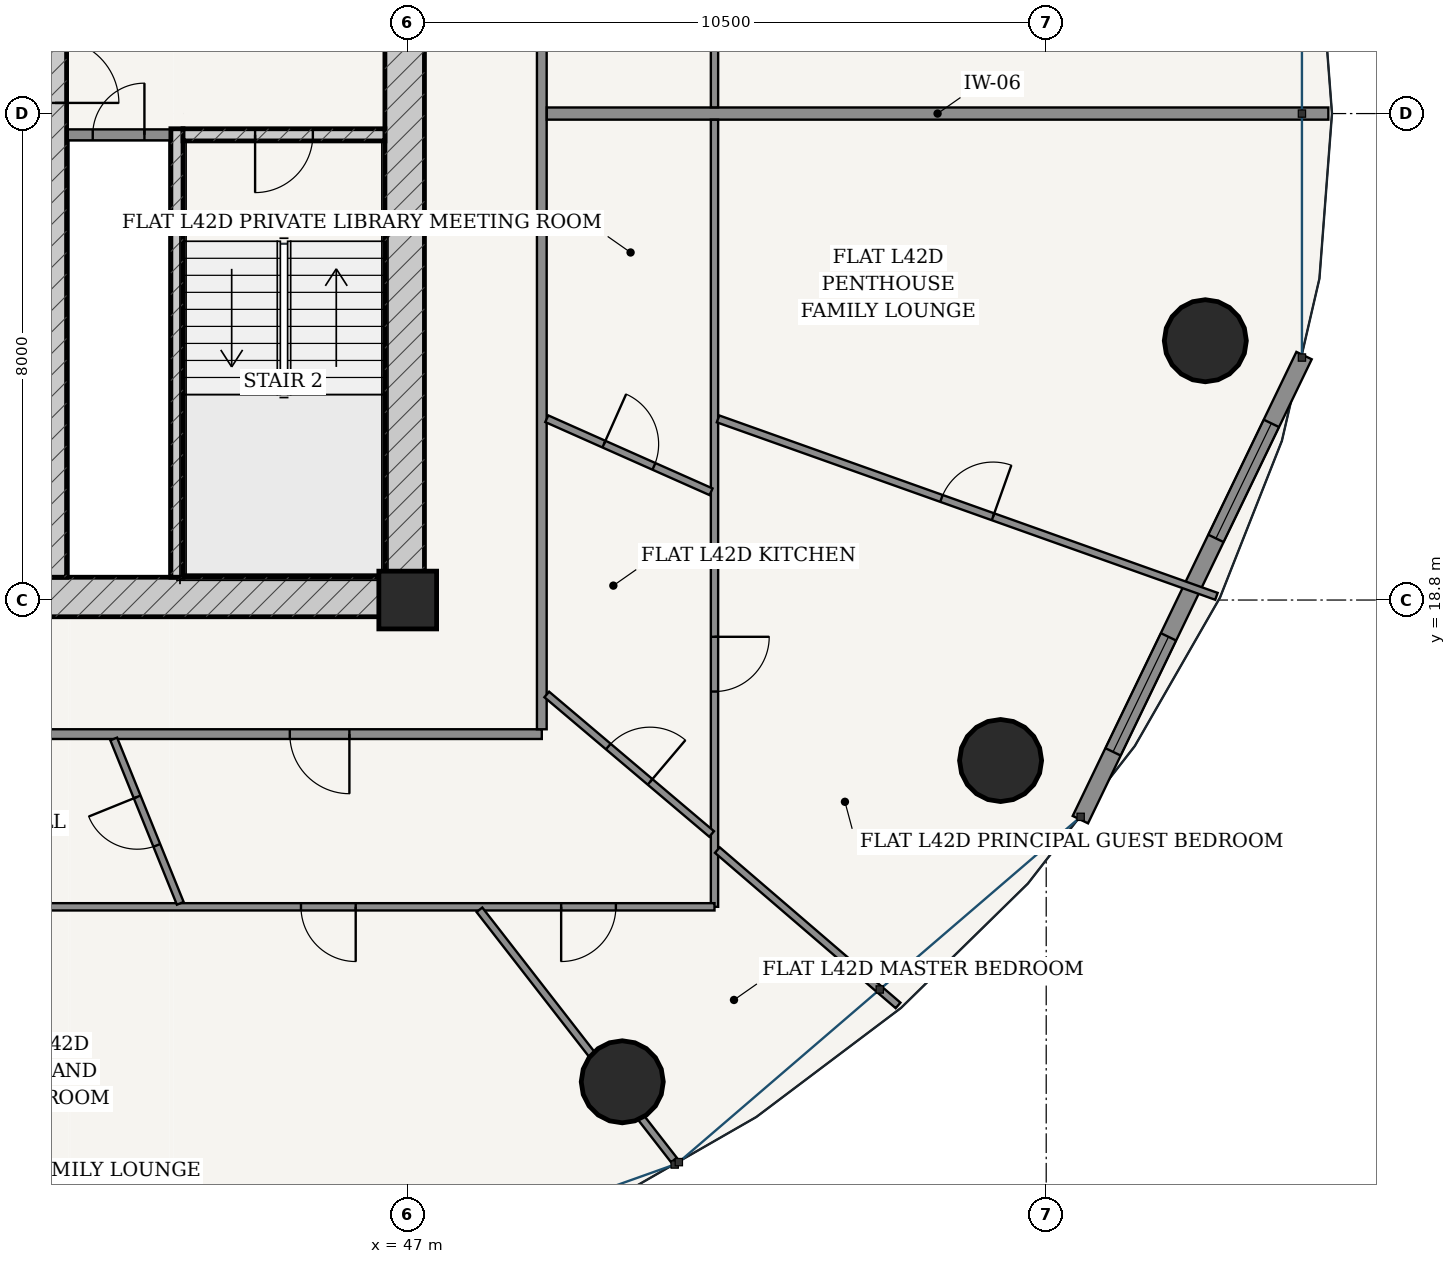
"""IFC4 building model, lengths in metres.
Left out: names, types, materials, properties, quantities, classifications, styles, units other than length and angle.
Written with IfcOpenShell. Run it as: python <this file> out.ifc"""

import sys

from ifc_helpers import new_model, si_unit, direction, frame, frame_2d, origin, origin_2d, place, context, subcontext, project, spatial, rectangle, hollow_circle, extrude, source, transform, mapped, element, fill, save


model = new_model("IFC4")
c1 = context("Model", 3, precision=1e-05, world=origin(), true_north=direction((-0.2419218956, 0.970295726276)))
c2 = subcontext(c1, "Body", "Model", "MODEL_VIEW")
j1 = project(units=[si_unit("LENGTHUNIT", "METRE"), si_unit("PLANEANGLEUNIT", "RADIAN")], contexts=[c1])
p1 = place(None, origin())
s1 = spatial("IfcSite", under=j1, at=p1, CompositionType="ELEMENT")
p2 = place(p1, origin())
s2 = spatial("IfcBuilding", under=s1, at=p2, CompositionType="ELEMENT")
p3 = place(p2, frame((0.0, 0.0, 160.6)))
s3 = spatial("IfcBuildingStorey", under=s2, at=p3, CompositionType="ELEMENT", Elevation=160.6)
p4 = place(p3, frame((47.0, 18.8, 0.0), z_axis=(0.0, 0.0, 1.0), x_axis=(1.0, 0.0, 0.0)))
e1 = element("IfcColumn", 1, at=p4, inside=s3, PredefinedType="COLUMN", context=c2, shape_type="SweptSolid", body=[
    extrude(rectangle(XDim=0.95, YDim=0.95, at=origin_2d()), origin(), (0.0, 0.0, 1.0), 3.6),
])
p5 = place(p3, frame((28.725, 18.85, 0.0), z_axis=(0.0, 0.0, 1.0), x_axis=(1.0, 0.0, 0.0)))
e2 = element("IfcWall", 2, at=p5, inside=s3, PredefinedType="SHEAR", context=c2, shape_type="SweptSolid", body=[
    extrude(rectangle(XDim=18.55, YDim=0.65, at=frame_2d((9.275, 0.0))), origin(), (0.0, 0.0, 1.0), 3.33),
])
p6 = place(p5, frame((8.85, 0.0, 0.0)))
e3 = element("IfcOpeningElement", 3, at=p6, cuts=e2, PredefinedType="OPENING", context=c2, shape_type="SweptSolid", body=[
    extrude(rectangle(XDim=0.85, YDim=2.1, at=frame_2d((0.425, 1.05))), frame((0.0, 0.335, 0.0), z_axis=(0.0, -1.0, 0.0), x_axis=(1.0, 0.0, 0.0)), (0.0, 0.0, 1.0), 0.67),
])
p7 = place(p3, frame((46.95, 19.175, 0.0), z_axis=(0.0, 0.0, 1.0), x_axis=(0.0, 1.0, 0.0)))
e4 = element("IfcWall", 4, at=p7, inside=s3, PredefinedType="SHEAR", context=c2, shape_type="SweptSolid", body=[
    extrude(rectangle(XDim=15.25, YDim=0.65, at=frame_2d((7.625, 0.0))), origin(), (0.0, 0.0, 1.0), 3.33),
])
p8 = place(p7, frame((9.875, 0.0, 0.0)))
e5 = element("IfcOpeningElement", 5, at=p8, cuts=e4, PredefinedType="OPENING", context=c2, shape_type="SweptSolid", body=[
    extrude(rectangle(XDim=1.5, YDim=2.2, at=frame_2d((0.75, 1.1))), frame((0.0, 0.335, 0.0), z_axis=(0.0, -1.0, 0.0), x_axis=(1.0, 0.0, 0.0)), (0.0, 0.0, 1.0), 0.67),
])
p9 = place(p3, frame((43.205, 19.175, 0.0), z_axis=(0.0, 0.0, 1.0), x_axis=(0.0, 1.0, 0.0)))
e6 = element("IfcWall", 6, at=p9, inside=s3, PredefinedType="SOLIDWALL", context=c2, shape_type="SweptSolid", body=[
    extrude(rectangle(XDim=7.375, YDim=0.2, at=frame_2d((3.688, 0.0))), origin(), (0.0, 0.0, 1.0), 3.33),
])
p10 = place(p3, frame((43.305, 26.45, 0.0), z_axis=(0.0, 0.0, 1.0), x_axis=(1.0, 0.0, 0.0)))
e7 = element("IfcWall", 7, at=p10, inside=s3, PredefinedType="SOLIDWALL", context=c2, shape_type="SweptSolid", body=[
    extrude(rectangle(XDim=3.32, YDim=0.2, at=frame_2d((1.66, 0.0))), origin(), (0.0, 0.0, 1.0), 3.33),
])
p11 = place(p10, frame((1.185, 0.0, 0.0)))
e8 = element("IfcOpeningElement", 8, at=p11, cuts=e7, PredefinedType="OPENING", context=c2, shape_type="SweptSolid", body=[
    extrude(rectangle(XDim=0.95, YDim=2.15, at=frame_2d((0.475, 1.075))), frame((0.0, 0.11, 0.0), z_axis=(0.0, -1.0, 0.0), x_axis=(1.0, 0.0, 0.0)), (0.0, 0.0, 1.0), 0.22),
])
p12 = place(p3, frame((41.2, 19.175, 0.0), z_axis=(0.0, 0.0, 1.0), x_axis=(0.0, 1.0, 0.0)))
e9 = element("IfcWall", 9, at=p12, inside=s3, PredefinedType="SHEAR", context=c2, shape_type="SweptSolid", body=[
    extrude(rectangle(XDim=15.25, YDim=0.38, at=frame_2d((7.625, 0.0))), origin(), (0.0, 0.0, 1.0), 3.33),
])
p13 = place(p12, frame((7.8, 0.0, 0.0)))
e10 = element("IfcOpeningElement", 10, at=p13, cuts=e9, PredefinedType="OPENING", context=c2, shape_type="SweptSolid", body=[
    extrude(rectangle(XDim=1.05, YDim=2.15, at=frame_2d((0.525, 1.075))), frame((0.0, 0.2, 0.0), z_axis=(0.0, -1.0, 0.0), x_axis=(1.0, 0.0, 0.0)), (0.0, 0.0, 1.0), 0.4),
])
for number, where, z_axis, x_axis in (
    (11, (50.528, 10.877, 0.0), (0.0, 0.0, 1.0), (1.0, 0.0, 0.0)),
    (12, (56.75, 16.161, 0.0), (0.0, 0.0, 1.0), (1.0, 0.0, 0.0)),
    (13, (60.117, 23.064, 0.0), (0.0, 0.0, 1.0), (1.0, 0.0, 0.0)),
):
    element("IfcColumn", number, at=place(p3, frame(where, z_axis=z_axis, x_axis=x_axis)), inside=s3, PredefinedType="COLUMN", context=c2, shape_type="SweptSolid", body=[
        extrude(hollow_circle(Radius=0.675, WallThickness=0.042, at=origin_2d()), origin(), (0.0, 0.0, 1.0), 3.6),
    ])
p14 = place(p3, frame((58.062, 15.189, 0.0), z_axis=(0.0, 0.0, 1.0), x_axis=(0.434209827226, 0.900811759437, 0.0)))
e14 = element("IfcWall", 14, at=p14, inside=s3, PredefinedType="SOLIDWALL", context=c2, shape_type="SweptSolid", body=[
    extrude(rectangle(XDim=8.472, YDim=0.28, at=frame_2d((4.236, 0.0))), origin(), (0.0, 0.0, 1.0), 3.33),
])
p15 = place(p14, frame((1.237, 0.0, 0.85)))
e15 = element("IfcOpeningElement", 15, at=p15, cuts=e14, PredefinedType="OPENING", context=c2, shape_type="SweptSolid", body=[
    extrude(rectangle(XDim=2.1, YDim=1.95, at=frame_2d((1.05, 0.975))), frame((0.0, 0.15, 0.0), z_axis=(0.0, -1.0, 0.0), x_axis=(1.0, 0.0, 0.0)), (0.0, 0.0, 1.0), 0.3),
])
p16 = place(p14, frame((5.134, 0.0, 0.85)))
e16 = element("IfcOpeningElement", 16, at=p16, cuts=e14, PredefinedType="OPENING", context=c2, shape_type="SweptSolid", body=[
    extrude(rectangle(XDim=2.1, YDim=1.95, at=frame_2d((1.05, 0.975))), frame((0.0, 0.15, 0.0), z_axis=(0.0, -1.0, 0.0), x_axis=(1.0, 0.0, 0.0)), (0.0, 0.0, 1.0), 0.3),
])
p17 = place(p3, frame((41.39, 26.45, 0.0), z_axis=(0.0, 0.0, 1.0), x_axis=(1.0, 0.0, 0.0)))
e17 = element("IfcWall", 17, at=p17, inside=s3, PredefinedType="PARTITIONING", context=c2, shape_type="SweptSolid", body=[
    extrude(rectangle(XDim=1.71, YDim=0.18, at=frame_2d((0.855, 0.0))), origin(), (0.0, 0.0, 1.0), 3.33),
])
p18 = place(p17, frame((0.43, 0.0, 0.0)))
e18 = element("IfcOpeningElement", 18, at=p18, cuts=e17, PredefinedType="OPENING", context=c2, shape_type="SweptSolid", body=[
    extrude(rectangle(XDim=0.85, YDim=2.1, at=frame_2d((0.425, 1.05))), frame((0.0, 0.1, 0.0), z_axis=(0.0, -1.0, 0.0), x_axis=(1.0, 0.0, 0.0)), (0.0, 0.0, 1.0), 0.2),
])
p19 = place(p3, frame((34.32, 16.595, 0.0), z_axis=(0.0, 0.0, 1.0), x_axis=(1.0, 0.0, 0.0)))
e19 = element("IfcWall", 19, at=p19, inside=s3, PredefinedType="PARTITIONING", context=c2, shape_type="SweptSolid", body=[
    extrude(rectangle(XDim=14.885, YDim=0.16, at=frame_2d((7.442, 0.0))), origin(), (0.0, 0.0, 1.0), 2.776),
])
p20 = place(p19, frame((1.484, 0.0, 0.0)))
e20 = element("IfcOpeningElement", 20, at=p20, cuts=e19, PredefinedType="OPENING", context=c2, shape_type="SweptSolid", body=[
    extrude(rectangle(XDim=0.98, YDim=2.2, at=frame_2d((0.49, 1.1))), frame((0.0, 0.09, 0.0), z_axis=(0.0, -1.0, 0.0), x_axis=(1.0, 0.0, 0.0)), (0.0, 0.0, 1.0), 0.18),
])
p21 = place(p19, frame((10.741, 0.0, 0.0)))
e21 = element("IfcOpeningElement", 21, at=p21, cuts=e19, PredefinedType="OPENING", context=c2, shape_type="SweptSolid", body=[
    extrude(rectangle(XDim=0.98, YDim=2.2, at=frame_2d((0.49, 1.1))), frame((0.0, 0.09, 0.0), z_axis=(0.0, -1.0, 0.0), x_axis=(1.0, 0.0, 0.0)), (0.0, 0.0, 1.0), 0.18),
])
p22 = place(p3, frame((49.205, 16.675, 0.0), z_axis=(0.0, 0.0, 1.0), x_axis=(0.0, 1.0, 0.0)))
e22 = element("IfcWall", 22, at=p22, inside=s3, PredefinedType="PARTITIONING", context=c2, shape_type="SweptSolid", body=[
    extrude(rectangle(XDim=18.4, YDim=0.16, at=frame_2d((9.2, 0.0))), origin(), (0.0, 0.0, 1.0), 2.776),
])
p23 = place(p22, frame((15.326, 0.0, 0.0)))
e23 = element("IfcOpeningElement", 23, at=p23, cuts=e22, PredefinedType="OPENING", context=c2, shape_type="SweptSolid", body=[
    extrude(rectangle(XDim=0.98, YDim=2.2, at=frame_2d((0.49, 1.1))), frame((0.0, 0.09, 0.0), z_axis=(0.0, -1.0, 0.0), x_axis=(1.0, 0.0, 0.0)), (0.0, 0.0, 1.0), 0.18),
])
p24 = place(p3, frame((49.287, 26.8, 0.0), z_axis=(0.0, 0.0, 1.0), x_axis=(1.0, 0.0, 0.0)))
e24 = element("IfcWall", 24, at=p24, inside=s3, PredefinedType="PARTITIONING", context=c2, shape_type="SweptSolid", body=[
    extrude(rectangle(XDim=12.853, YDim=0.2, at=frame_2d((6.426, 0.0))), origin(), (0.0, 0.0, 1.0), 2.846),
])
p25 = place(p3, frame((52.045, 37.995, 0.0), z_axis=(0.0, 0.0, 1.0), x_axis=(0.0, -1.0, 0.0)))
e25 = element("IfcWall", 25, at=p25, inside=s3, PredefinedType="PARTITIONING", context=c2, shape_type="SweptSolid", body=[
    extrude(rectangle(XDim=11.093, YDim=0.12, at=frame_2d((5.546, 0.0))), origin(), (0.0, 0.0, 1.0), 2.776),
])
p26 = place(p25, frame((4.638, 0.0, 0.0)))
e26 = element("IfcOpeningElement", 26, at=p26, cuts=e25, PredefinedType="OPENING", context=c2, shape_type="SweptSolid", body=[
    extrude(rectangle(XDim=0.9, YDim=2.15, at=frame_2d((0.45, 1.075))), frame((0.0, 0.07, 0.0), z_axis=(0.0, -1.0, 0.0), x_axis=(1.0, 0.0, 0.0)), (0.0, 0.0, 1.0), 0.14),
])
p27 = place(p3, frame((52.045, 26.698, 0.0), z_axis=(0.0, 0.0, 1.0), x_axis=(0.0, -1.0, 0.0)))
e27 = element("IfcWall", 27, at=p27, inside=s3, PredefinedType="PARTITIONING", context=c2, shape_type="SweptSolid", body=[
    extrude(rectangle(XDim=12.943, YDim=0.12, at=frame_2d((6.472, 0.0))), origin(), (0.0, 0.0, 1.0), 2.776),
])
p28 = place(p27, frame((8.503, 0.0, 0.0)))
e28 = element("IfcOpeningElement", 28, at=p28, cuts=e27, PredefinedType="OPENING", context=c2, shape_type="SweptSolid", body=[
    extrude(rectangle(XDim=0.9, YDim=2.15, at=frame_2d((0.45, 1.075))), frame((0.0, 0.07, 0.0), z_axis=(0.0, -1.0, 0.0), x_axis=(1.0, 0.0, 0.0)), (0.0, 0.0, 1.0), 0.14),
])
p29 = place(p3, frame((52.045, 13.755, 0.0), z_axis=(0.0, 0.0, 1.0), x_axis=(-1.0, 0.0, 0.0)))
e29 = element("IfcWall", 29, at=p29, inside=s3, PredefinedType="PARTITIONING", context=c2, shape_type="SweptSolid", body=[
    extrude(rectangle(XDim=13.943, YDim=0.12, at=frame_2d((6.971, 0.0))), origin(), (0.0, 0.0, 1.0), 2.776),
])
p30 = place(p29, frame((5.9, 0.0, 0.0)))
e30 = element("IfcOpeningElement", 30, at=p30, cuts=e29, PredefinedType="OPENING", context=c2, shape_type="SweptSolid", body=[
    extrude(rectangle(XDim=0.9, YDim=2.15, at=frame_2d((0.45, 1.075))), frame((0.0, 0.07, 0.0), z_axis=(0.0, -1.0, 0.0), x_axis=(1.0, 0.0, 0.0)), (0.0, 0.0, 1.0), 0.14),
])
p31 = place(p29, frame((1.622, 0.0, 0.0)))
e31 = element("IfcOpeningElement", 31, at=p31, cuts=e29, PredefinedType="OPENING", context=c2, shape_type="SweptSolid", body=[
    extrude(rectangle(XDim=0.9, YDim=2.15, at=frame_2d((0.45, 1.075))), frame((0.0, 0.07, 0.0), z_axis=(0.0, -1.0, 0.0), x_axis=(1.0, 0.0, 0.0)), (0.0, 0.0, 1.0), 0.14),
])
p32 = place(p3, frame((48.179, 13.706, 0.0), z_axis=(0.0, 0.0, 1.0), x_axis=(0.613759011764, -0.789493429662, 0.0)))
e32 = element("IfcWall", 32, at=p32, inside=s3, PredefinedType="PARTITIONING", context=c2, shape_type="SweptSolid", body=[
    extrude(rectangle(XDim=5.212, YDim=0.12, at=frame_2d((2.606, 0.0))), origin(), (0.0, 0.0, 1.0), 2.776),
])
p33 = place(p3, frame((52.092, 14.688, 0.0), z_axis=(0.0, 0.0, 1.0), x_axis=(0.758367509429, -0.651827216862, 0.0)))
e33 = element("IfcWall", 33, at=p33, inside=s3, PredefinedType="PARTITIONING", context=c2, shape_type="SweptSolid", body=[
    extrude(rectangle(XDim=3.918, YDim=0.12, at=frame_2d((1.959, 0.0))), origin(), (0.0, 0.0, 1.0), 2.846),
])
p34 = place(p3, frame((52.104, 21.779, 0.0), z_axis=(0.0, 0.0, 1.0), x_axis=(0.942081743482, -0.335383345736, 0.0)))
e34 = element("IfcWall", 34, at=p34, inside=s3, PredefinedType="PARTITIONING", context=c2, shape_type="SweptSolid", body=[
    extrude(rectangle(XDim=8.7, YDim=0.12, at=frame_2d((4.35, 0.0))), origin(), (0.0, 0.0, 1.0), 2.846),
])
p35 = place(p34, frame((3.9, 0.0, 0.0)))
e35 = element("IfcOpeningElement", 35, at=p35, cuts=e34, PredefinedType="OPENING", context=c2, shape_type="SweptSolid", body=[
    extrude(rectangle(XDim=0.9, YDim=2.15, at=frame_2d((0.45, 1.075))), frame((0.0, 0.07, 0.0), z_axis=(0.0, -1.0, 0.0), x_axis=(1.0, 0.0, 0.0)), (0.0, 0.0, 1.0), 0.14),
])
p36 = place(p3, frame((42.165, 16.515, 0.0), z_axis=(0.0, 0.0, 1.0), x_axis=(0.375386324206, -0.926868441365, 0.0)))
e36 = element("IfcWall", 36, at=p36, inside=s3, PredefinedType="PARTITIONING", context=c2, shape_type="SweptSolid", body=[
    extrude(rectangle(XDim=2.916, YDim=0.12, at=frame_2d((1.458, 0.0))), origin(), (0.0, 0.0, 1.0), 3.005),
])
p37 = place(p36, frame((1.028, 0.0, 0.0)))
e37 = element("IfcOpeningElement", 37, at=p37, cuts=e36, PredefinedType="OPENING", context=c2, shape_type="SweptSolid", body=[
    extrude(rectangle(XDim=0.86, YDim=2.15, at=frame_2d((0.43, 1.075))), frame((0.0, 0.07, 0.0), z_axis=(0.0, -1.0, 0.0), x_axis=(1.0, 0.0, 0.0)), (0.0, 0.0, 1.0), 0.14),
])
p38 = place(p3, frame((49.287, 17.248, 0.0), z_axis=(0.0, 0.0, 1.0), x_axis=(0.763274158734, -0.646074731443, 0.0)))
e38 = element("IfcWall", 38, at=p38, inside=s3, PredefinedType="PARTITIONING", context=c2, shape_type="SweptSolid", body=[
    extrude(rectangle(XDim=3.552, YDim=0.12, at=frame_2d((1.776, 0.0))), origin(), (0.0, 0.0, 1.0), 3.005),
])
p39 = place(p38, frame((1.326, 0.0, 0.0)))
e39 = element("IfcOpeningElement", 39, at=p39, cuts=e38, PredefinedType="OPENING", context=c2, shape_type="SweptSolid", body=[
    extrude(rectangle(XDim=0.9, YDim=2.15, at=frame_2d((0.45, 1.075))), frame((0.0, 0.07, 0.0), z_axis=(0.0, -1.0, 0.0), x_axis=(1.0, 0.0, 0.0)), (0.0, 0.0, 1.0), 0.14),
])
p40 = place(p3, frame((49.287, 21.781, 0.0), z_axis=(0.0, 0.0, 1.0), x_axis=(0.913743428873, -0.406291700864, 0.0)))
e40 = element("IfcWall", 40, at=p40, inside=s3, PredefinedType="PARTITIONING", context=c2, shape_type="SweptSolid", body=[
    extrude(rectangle(XDim=2.957, YDim=0.12, at=frame_2d((1.478, 0.0))), origin(), (0.0, 0.0, 1.0), 3.33),
])
p41 = place(p40, frame((1.028, 0.0, 0.0)))
e41 = element("IfcOpeningElement", 41, at=p41, cuts=e40, PredefinedType="OPENING", context=c2, shape_type="SweptSolid", body=[
    extrude(rectangle(XDim=0.9, YDim=2.15, at=frame_2d((0.45, 1.075))), frame((0.0, 0.07, 0.0), z_axis=(0.0, -1.0, 0.0), x_axis=(1.0, 0.0, 0.0)), (0.0, 0.0, 1.0), 0.14),
])
m1 = source(origin(), c2, "Body", "SweptSolid", [
    extrude(rectangle(XDim=2.1, YDim=1.95, at=frame_2d((1.05, 0.975))), frame((0.0, 0.03, 0.0), z_axis=(0.0, -1.0, 0.0), x_axis=(1.0, 0.0, 0.0)), (0.0, 0.0, 1.0), 0.06),
])
p42 = place(p15, origin())
e42 = element("IfcWindow", 42, at=p42, inside=s3, PartitioningType="SINGLE_PANEL", PredefinedType="WINDOW", context=c2, shape_type="MappedRepresentation", body=[
    mapped(m1, transform((0.0, 0.0, 0.0), scale=1.0)),
])
fill(e15, e42)
p43 = place(p16, origin())
e43 = element("IfcWindow", 43, at=p43, inside=s3, PartitioningType="SINGLE_PANEL", PredefinedType="WINDOW", context=c2, shape_type="MappedRepresentation", body=[
    mapped(m1, transform((0.0, 0.0, 0.0), scale=1.0)),
])
fill(e16, e43)
m2 = source(origin(), c2, "Body", "SweptSolid", [
    extrude(rectangle(XDim=1.05, YDim=2.15, at=frame_2d((0.525, 1.075))), frame((0.0, 0.025, 0.0), z_axis=(0.0, -1.0, 0.0), x_axis=(1.0, 0.0, 0.0)), (0.0, 0.0, 1.0), 0.05),
])
p44 = place(p13, frame((1.05, 0.0, 0.0), z_axis=(0.0, 0.0, 1.0), x_axis=(-1.0, 0.0, 0.0)))
e44 = element("IfcDoor", 44, at=p44, inside=s3, OperationType="SINGLE_SWING_RIGHT", PredefinedType="DOOR", context=c2, shape_type="MappedRepresentation", body=[
    mapped(m2, transform((0.0, 0.0, 0.0), scale=1.0)),
])
fill(e10, e44)
m3 = source(origin(), c2, "Body", "SweptSolid", [
    extrude(rectangle(XDim=0.95, YDim=2.15, at=frame_2d((0.475, 1.075))), frame((0.0, 0.025, 0.0), z_axis=(0.0, -1.0, 0.0), x_axis=(1.0, 0.0, 0.0)), (0.0, 0.0, 1.0), 0.05),
])
p45 = place(p11, frame((0.95, 0.0, 0.0), z_axis=(0.0, 0.0, 1.0), x_axis=(-1.0, 0.0, 0.0)))
e45 = element("IfcDoor", 45, at=p45, inside=s3, OperationType="SINGLE_SWING_RIGHT", PredefinedType="DOOR", context=c2, shape_type="MappedRepresentation", body=[
    mapped(m3, transform((0.0, 0.0, 0.0), scale=1.0)),
])
fill(e8, e45)
m4 = source(origin(), c2, "Body", "SweptSolid", [
    extrude(rectangle(XDim=0.85, YDim=2.1, at=frame_2d((0.425, 1.05))), frame((0.0, 0.025, 0.0), z_axis=(0.0, -1.0, 0.0), x_axis=(1.0, 0.0, 0.0)), (0.0, 0.0, 1.0), 0.05),
])
p46 = place(p18, origin())
e46 = element("IfcDoor", 46, at=p46, inside=s3, OperationType="SINGLE_SWING_RIGHT", PredefinedType="DOOR", context=c2, shape_type="MappedRepresentation", body=[
    mapped(m4, transform((0.0, 0.0, 0.0), scale=1.0)),
])
fill(e18, e46)
m5 = source(origin(), c2, "Body", "SweptSolid", [
    extrude(rectangle(XDim=0.98, YDim=2.2, at=frame_2d((0.49, 1.1))), frame((0.0, 0.025, 0.0), z_axis=(0.0, -1.0, 0.0), x_axis=(1.0, 0.0, 0.0)), (0.0, 0.0, 1.0), 0.05),
])
p47 = place(p21, frame((0.98, 0.0, 0.0), z_axis=(0.0, 0.0, 1.0), x_axis=(-1.0, 0.0, 0.0)))
e47 = element("IfcDoor", 47, at=p47, inside=s3, OperationType="SINGLE_SWING_LEFT", PredefinedType="DOOR", context=c2, shape_type="MappedRepresentation", body=[
    mapped(m5, transform((0.0, 0.0, 0.0), scale=1.0)),
])
fill(e21, e47)
m6 = source(origin(), c2, "Body", "SweptSolid", [
    extrude(rectangle(XDim=0.86, YDim=2.15, at=frame_2d((0.43, 1.075))), frame((0.0, 0.025, 0.0), z_axis=(0.0, -1.0, 0.0), x_axis=(1.0, 0.0, 0.0)), (0.0, 0.0, 1.0), 0.05),
])
p48 = place(p37, frame((0.86, 0.0, 0.0), z_axis=(0.0, 0.0, 1.0), x_axis=(-1.0, 0.0, 0.0)))
e48 = element("IfcDoor", 48, at=p48, inside=s3, OperationType="SINGLE_SWING_RIGHT", PredefinedType="DOOR", context=c2, shape_type="MappedRepresentation", body=[
    mapped(m6, transform((0.0, 0.0, 0.0), scale=1.0)),
])
fill(e37, e48)
m7 = source(origin(), c2, "Body", "SweptSolid", [
    extrude(rectangle(XDim=0.9, YDim=2.15, at=frame_2d((0.45, 1.075))), frame((0.0, 0.025, 0.0), z_axis=(0.0, -1.0, 0.0), x_axis=(1.0, 0.0, 0.0)), (0.0, 0.0, 1.0), 0.05),
])
p49 = place(p30, origin())
e49 = element("IfcDoor", 49, at=p49, inside=s3, OperationType="SINGLE_SWING_LEFT", PredefinedType="DOOR", context=c2, shape_type="MappedRepresentation", body=[
    mapped(m7, transform((0.0, 0.0, 0.0), scale=1.0)),
])
fill(e30, e49)
p50 = place(p39, origin())
e50 = element("IfcDoor", 50, at=p50, inside=s3, OperationType="SINGLE_SWING_RIGHT", PredefinedType="DOOR", context=c2, shape_type="MappedRepresentation", body=[
    mapped(m7, transform((0.0, 0.0, 0.0), scale=1.0)),
])
fill(e39, e50)
p51 = place(p41, origin())
e51 = element("IfcDoor", 51, at=p51, inside=s3, OperationType="SINGLE_SWING_LEFT", PredefinedType="DOOR", context=c2, shape_type="MappedRepresentation", body=[
    mapped(m7, transform((0.0, 0.0, 0.0), scale=1.0)),
])
fill(e41, e51)
p52 = place(p31, origin())
e52 = element("IfcDoor", 52, at=p52, inside=s3, OperationType="SINGLE_SWING_RIGHT", PredefinedType="DOOR", context=c2, shape_type="MappedRepresentation", body=[
    mapped(m7, transform((0.0, 0.0, 0.0), scale=1.0)),
])
fill(e31, e52)
p53 = place(p28, origin())
e53 = element("IfcDoor", 53, at=p53, inside=s3, OperationType="SINGLE_SWING_LEFT", PredefinedType="DOOR", context=c2, shape_type="MappedRepresentation", body=[
    mapped(m7, transform((0.0, 0.0, 0.0), scale=1.0)),
])
fill(e28, e53)
p54 = place(p35, origin())
e54 = element("IfcDoor", 54, at=p54, inside=s3, OperationType="SINGLE_SWING_RIGHT", PredefinedType="DOOR", context=c2, shape_type="MappedRepresentation", body=[
    mapped(m7, transform((0.0, 0.0, 0.0), scale=1.0)),
])
fill(e35, e54)
save(model, sys.argv[1])
